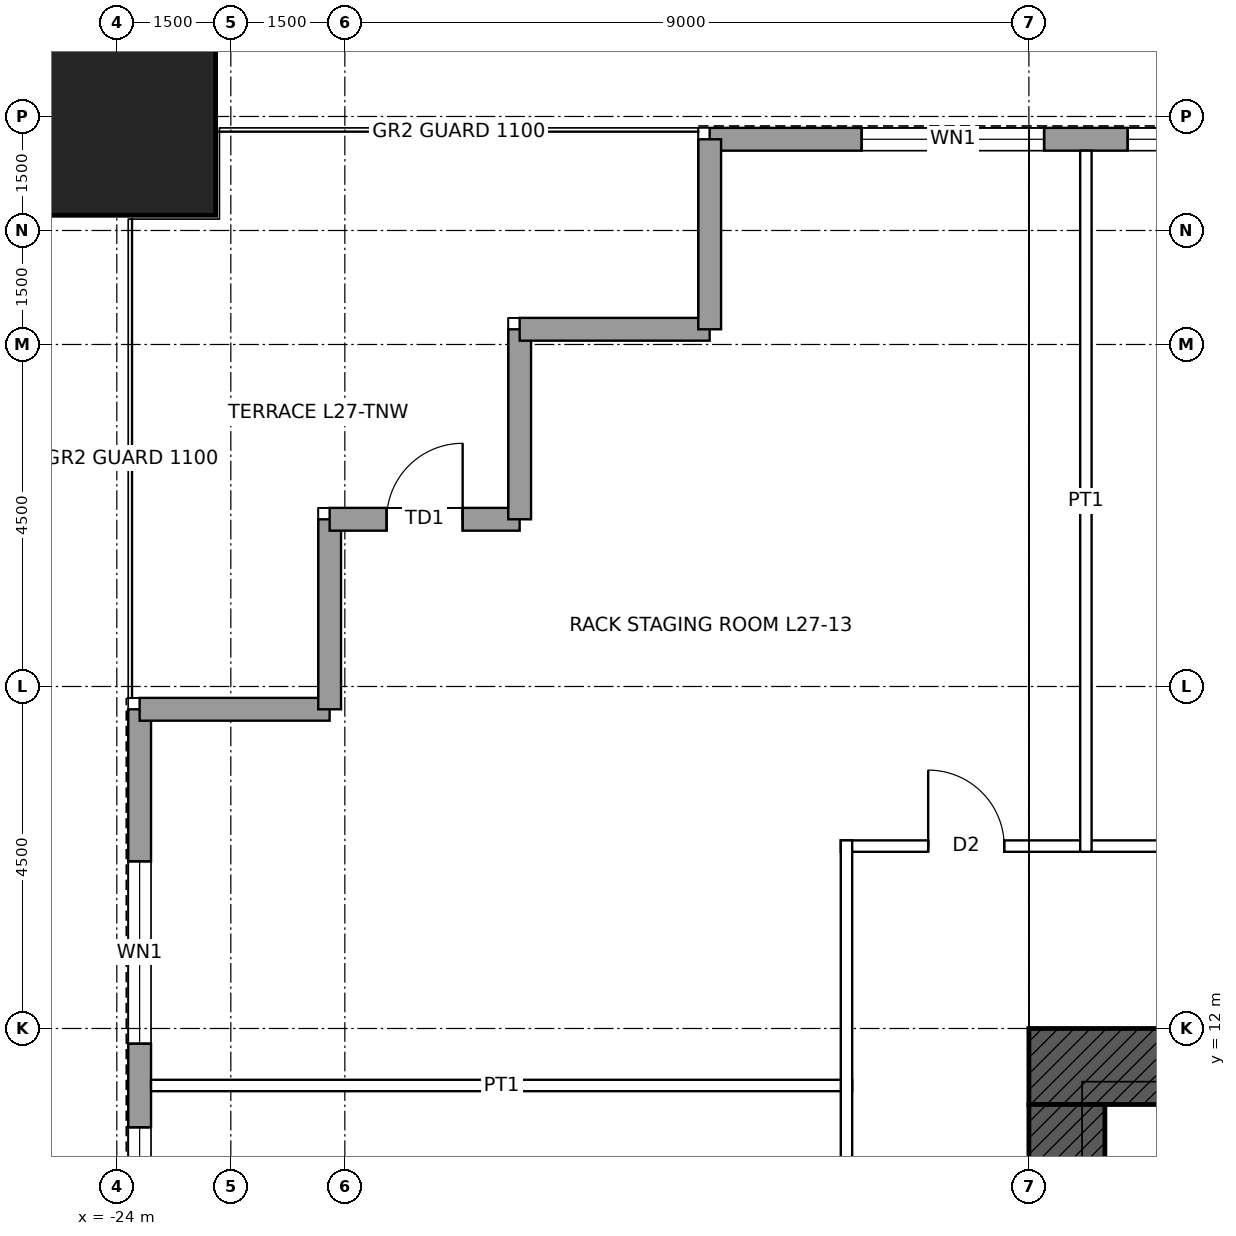
"""IFC4 building model, lengths in metres.
Left out: names, types, materials, properties, quantities, classifications, styles, units other than length and angle.
Written with IfcOpenShell. Run it as: python <this file> out.ifc"""

import sys

from ifc_helpers import new_model, si_unit, direction, frame, frame_2d, origin, origin_2d, place, context, subcontext, project, spatial, rectangle, hollow_rectangle, extrude, element, fill, save


model = new_model("IFC4")
c1 = context("Model", 3, precision=1e-05, world=origin(), true_north=direction((0.0, 1.0)))
c2 = subcontext(c1, "Body", "Model", "MODEL_VIEW")
j1 = project(units=[si_unit("LENGTHUNIT", "METRE"), si_unit("PLANEANGLEUNIT", "RADIAN")], contexts=[c1])
p1 = place(None, origin())
s1 = spatial("IfcSite", under=j1, at=p1, CompositionType="ELEMENT")
p2 = place(p1, origin())
s2 = spatial("IfcBuilding", under=s1, at=p2, CompositionType="ELEMENT")
p3 = place(p2, frame((0.0, 0.0, 135.9)))
s3 = spatial("IfcBuildingStorey", under=s2, at=p3, CompositionType="ELEMENT", Elevation=135.9)
p4 = place(p3, frame((-24.0, 24.0, 0.0), z_axis=(0.0, 0.0, 1.0), x_axis=(1.0, 0.0, 0.0)))
e1 = element("IfcColumn", 1, at=p4, inside=s3, PredefinedType="COLUMN", context=c2, shape_type="SweptSolid", body=[
    extrude(hollow_rectangle(XDim=2.6, YDim=2.6, WallThickness=0.13, at=origin_2d()), origin(), (0.0, 0.0, 1.0), 4.5),
])
p5 = place(p3, frame((-12.0, 11.5, 0.0), z_axis=(0.0, 0.0, 1.0), x_axis=(1.0, 0.0, 0.0)))
e2 = element("IfcWall", 2, at=p5, inside=s3, PredefinedType="SHEAR", context=c2, shape_type="SweptSolid", body=[
    extrude(rectangle(XDim=24.0, YDim=1.0, at=frame_2d((12.0, 0.0))), origin(), (0.0, 0.0, 1.0), 4.5),
])
p6 = place(p5, frame((6.25, 0.0, 0.0)))
e3 = element("IfcOpeningElement", 3, at=p6, cuts=e2, PredefinedType="OPENING", context=c2, shape_type="SweptSolid", body=[
    extrude(rectangle(XDim=1.0, YDim=2.4, at=frame_2d((0.5, 1.2))), frame((0.0, 0.51, 0.0), z_axis=(0.0, -1.0, 0.0), x_axis=(1.0, 0.0, 0.0)), (0.0, 0.0, 1.0), 1.02),
])
p7 = place(p5, frame((16.75, 0.0, 0.0)))
e4 = element("IfcOpeningElement", 4, at=p7, cuts=e2, PredefinedType="OPENING", context=c2, shape_type="SweptSolid", body=[
    extrude(rectangle(XDim=1.0, YDim=2.4, at=frame_2d((0.5, 1.2))), frame((0.0, 0.51, 0.0), z_axis=(0.0, -1.0, 0.0), x_axis=(1.0, 0.0, 0.0)), (0.0, 0.0, 1.0), 1.02),
])
p8 = place(p3, frame((-11.5, -11.0, 0.0), z_axis=(0.0, 0.0, 1.0), x_axis=(0.0, 1.0, 0.0)))
e5 = element("IfcWall", 5, at=p8, inside=s3, PredefinedType="SHEAR", context=c2, shape_type="SweptSolid", body=[
    extrude(rectangle(XDim=22.0, YDim=1.0, at=frame_2d((11.0, 0.0))), origin(), (0.0, 0.0, 1.0), 4.5),
])
p9 = place(p8, frame((10.5, 0.0, 0.0)))
e6 = element("IfcOpeningElement", 6, at=p9, cuts=e5, PredefinedType="OPENING", context=c2, shape_type="SweptSolid", body=[
    extrude(rectangle(XDim=1.0, YDim=2.4, at=frame_2d((0.5, 1.2))), frame((0.0, 0.51, 0.0), z_axis=(0.0, -1.0, 0.0), x_axis=(1.0, 0.0, 0.0)), (0.0, 0.0, 1.0), 1.02),
])
p10 = place(p3, frame((-16.2, 23.7, 0.0), z_axis=(0.0, 0.0, 1.0), x_axis=(1.0, 0.0, 0.0)))
e7 = element("IfcWall", 7, at=p10, inside=s3, PredefinedType="SOLIDWALL", context=c2, shape_type="SweptSolid", body=[
    extrude(rectangle(XDim=32.4, YDim=0.3, at=frame_2d((16.2, 0.0))), origin(), (0.0, 0.0, 1.0), 4.3),
])
p11 = place(p10, frame((2.0, 0.0, 1.0)))
e8 = element("IfcOpeningElement", 8, at=p11, cuts=e7, PredefinedType="OPENING", context=c2, shape_type="SweptSolid", body=[
    extrude(rectangle(XDim=2.4, YDim=1.2, at=frame_2d((1.2, 0.6))), frame((0.0, 0.16, 0.0), z_axis=(0.0, -1.0, 0.0), x_axis=(1.0, 0.0, 0.0)), (0.0, 0.0, 1.0), 0.32),
])
p12 = place(p10, frame((5.5, 0.0, 1.0)))
e9 = element("IfcOpeningElement", 9, at=p12, cuts=e7, PredefinedType="OPENING", context=c2, shape_type="SweptSolid", body=[
    extrude(rectangle(XDim=2.4, YDim=1.2, at=frame_2d((1.2, 0.6))), frame((0.0, 0.16, 0.0), z_axis=(0.0, -1.0, 0.0), x_axis=(1.0, 0.0, 0.0)), (0.0, 0.0, 1.0), 0.32),
])
p13 = place(p10, frame((9.5, 0.0, 1.0)))
e10 = element("IfcOpeningElement", 10, at=p13, cuts=e7, PredefinedType="OPENING", context=c2, shape_type="SweptSolid", body=[
    extrude(rectangle(XDim=2.4, YDim=1.2, at=frame_2d((1.2, 0.6))), frame((0.0, 0.16, 0.0), z_axis=(0.0, -1.0, 0.0), x_axis=(1.0, 0.0, 0.0)), (0.0, 0.0, 1.0), 0.32),
])
p14 = place(p10, frame((13.0, 0.0, 1.0)))
e11 = element("IfcOpeningElement", 11, at=p14, cuts=e7, PredefinedType="OPENING", context=c2, shape_type="SweptSolid", body=[
    extrude(rectangle(XDim=2.4, YDim=1.2, at=frame_2d((1.2, 0.6))), frame((0.0, 0.16, 0.0), z_axis=(0.0, -1.0, 0.0), x_axis=(1.0, 0.0, 0.0)), (0.0, 0.0, 1.0), 0.32),
])
p15 = place(p10, frame((17.0, 0.0, 1.0)))
e12 = element("IfcOpeningElement", 12, at=p15, cuts=e7, PredefinedType="OPENING", context=c2, shape_type="SweptSolid", body=[
    extrude(rectangle(XDim=2.4, YDim=1.2, at=frame_2d((1.2, 0.6))), frame((0.0, 0.16, 0.0), z_axis=(0.0, -1.0, 0.0), x_axis=(1.0, 0.0, 0.0)), (0.0, 0.0, 1.0), 0.32),
])
p16 = place(p10, frame((20.5, 0.0, 1.0)))
e13 = element("IfcOpeningElement", 13, at=p16, cuts=e7, PredefinedType="OPENING", context=c2, shape_type="SweptSolid", body=[
    extrude(rectangle(XDim=2.4, YDim=1.2, at=frame_2d((1.2, 0.6))), frame((0.0, 0.16, 0.0), z_axis=(0.0, -1.0, 0.0), x_axis=(1.0, 0.0, 0.0)), (0.0, 0.0, 1.0), 0.32),
])
p17 = place(p10, frame((24.5, 0.0, 1.0)))
e14 = element("IfcOpeningElement", 14, at=p17, cuts=e7, PredefinedType="OPENING", context=c2, shape_type="SweptSolid", body=[
    extrude(rectangle(XDim=2.4, YDim=1.2, at=frame_2d((1.2, 0.6))), frame((0.0, 0.16, 0.0), z_axis=(0.0, -1.0, 0.0), x_axis=(1.0, 0.0, 0.0)), (0.0, 0.0, 1.0), 0.32),
])
p18 = place(p10, frame((28.0, 0.0, 1.0)))
e15 = element("IfcOpeningElement", 15, at=p18, cuts=e7, PredefinedType="OPENING", context=c2, shape_type="SweptSolid", body=[
    extrude(rectangle(XDim=2.4, YDim=1.2, at=frame_2d((1.2, 0.6))), frame((0.0, 0.16, 0.0), z_axis=(0.0, -1.0, 0.0), x_axis=(1.0, 0.0, 0.0)), (0.0, 0.0, 1.0), 0.32),
])
p19 = place(p3, frame((-23.7, -16.2, 0.0), z_axis=(0.0, 0.0, 1.0), x_axis=(0.0, 1.0, 0.0)))
e16 = element("IfcWall", 16, at=p19, inside=s3, PredefinedType="SOLIDWALL", context=c2, shape_type="SweptSolid", body=[
    extrude(rectangle(XDim=32.4, YDim=0.3, at=frame_2d((16.2, 0.0))), origin(), (0.0, 0.0, 1.0), 4.3),
])
p20 = place(p19, frame((2.0, 0.0, 1.0)))
e17 = element("IfcOpeningElement", 17, at=p20, cuts=e16, PredefinedType="OPENING", context=c2, shape_type="SweptSolid", body=[
    extrude(rectangle(XDim=2.4, YDim=1.2, at=frame_2d((1.2, 0.6))), frame((0.0, 0.16, 0.0), z_axis=(0.0, -1.0, 0.0), x_axis=(1.0, 0.0, 0.0)), (0.0, 0.0, 1.0), 0.32),
])
p21 = place(p19, frame((5.5, 0.0, 1.0)))
e18 = element("IfcOpeningElement", 18, at=p21, cuts=e16, PredefinedType="OPENING", context=c2, shape_type="SweptSolid", body=[
    extrude(rectangle(XDim=2.4, YDim=1.2, at=frame_2d((1.2, 0.6))), frame((0.0, 0.16, 0.0), z_axis=(0.0, -1.0, 0.0), x_axis=(1.0, 0.0, 0.0)), (0.0, 0.0, 1.0), 0.32),
])
p22 = place(p19, frame((9.5, 0.0, 1.0)))
e19 = element("IfcOpeningElement", 19, at=p22, cuts=e16, PredefinedType="OPENING", context=c2, shape_type="SweptSolid", body=[
    extrude(rectangle(XDim=2.4, YDim=1.2, at=frame_2d((1.2, 0.6))), frame((0.0, 0.16, 0.0), z_axis=(0.0, -1.0, 0.0), x_axis=(1.0, 0.0, 0.0)), (0.0, 0.0, 1.0), 0.32),
])
p23 = place(p19, frame((13.0, 0.0, 1.0)))
e20 = element("IfcOpeningElement", 20, at=p23, cuts=e16, PredefinedType="OPENING", context=c2, shape_type="SweptSolid", body=[
    extrude(rectangle(XDim=2.4, YDim=1.2, at=frame_2d((1.2, 0.6))), frame((0.0, 0.16, 0.0), z_axis=(0.0, -1.0, 0.0), x_axis=(1.0, 0.0, 0.0)), (0.0, 0.0, 1.0), 0.32),
])
p24 = place(p19, frame((17.0, 0.0, 1.0)))
e21 = element("IfcOpeningElement", 21, at=p24, cuts=e16, PredefinedType="OPENING", context=c2, shape_type="SweptSolid", body=[
    extrude(rectangle(XDim=2.4, YDim=1.2, at=frame_2d((1.2, 0.6))), frame((0.0, 0.16, 0.0), z_axis=(0.0, -1.0, 0.0), x_axis=(1.0, 0.0, 0.0)), (0.0, 0.0, 1.0), 0.32),
])
p25 = place(p19, frame((20.5, 0.0, 1.0)))
e22 = element("IfcOpeningElement", 22, at=p25, cuts=e16, PredefinedType="OPENING", context=c2, shape_type="SweptSolid", body=[
    extrude(rectangle(XDim=2.4, YDim=1.2, at=frame_2d((1.2, 0.6))), frame((0.0, 0.16, 0.0), z_axis=(0.0, -1.0, 0.0), x_axis=(1.0, 0.0, 0.0)), (0.0, 0.0, 1.0), 0.32),
])
p26 = place(p19, frame((24.5, 0.0, 1.0)))
e23 = element("IfcOpeningElement", 23, at=p26, cuts=e16, PredefinedType="OPENING", context=c2, shape_type="SweptSolid", body=[
    extrude(rectangle(XDim=2.4, YDim=1.2, at=frame_2d((1.2, 0.6))), frame((0.0, 0.16, 0.0), z_axis=(0.0, -1.0, 0.0), x_axis=(1.0, 0.0, 0.0)), (0.0, 0.0, 1.0), 0.32),
])
p27 = place(p19, frame((28.0, 0.0, 1.0)))
e24 = element("IfcOpeningElement", 24, at=p27, cuts=e16, PredefinedType="OPENING", context=c2, shape_type="SweptSolid", body=[
    extrude(rectangle(XDim=2.4, YDim=1.2, at=frame_2d((1.2, 0.6))), frame((0.0, 0.16, 0.0), z_axis=(0.0, -1.0, 0.0), x_axis=(1.0, 0.0, 0.0)), (0.0, 0.0, 1.0), 0.32),
])
for number, where, z_axis, x_axis in (
    (25, (-23.7, 16.2, 0.0), (0.0, 0.0, 1.0), (1.0, 0.0, 0.0)),
    (26, (-21.2, 16.2, 0.0), (0.0, 0.0, 1.0), (0.0, 1.0, 0.0)),
):
    element("IfcWall", number, at=place(p3, frame(where, z_axis=z_axis, x_axis=x_axis)), inside=s3, PredefinedType="SOLIDWALL", context=c2, shape_type="SweptSolid", body=[
        extrude(rectangle(XDim=2.5, YDim=0.3, at=frame_2d((1.25, 0.0))), origin(), (0.0, 0.0, 1.0), 4.3),
    ])
p28 = place(p3, frame((-21.2, 18.7, 0.0), z_axis=(0.0, 0.0, 1.0), x_axis=(1.0, 0.0, 0.0)))
e27 = element("IfcWall", 27, at=p28, inside=s3, PredefinedType="SOLIDWALL", context=c2, shape_type="SweptSolid", body=[
    extrude(rectangle(XDim=2.5, YDim=0.3, at=frame_2d((1.25, 0.0))), origin(), (0.0, 0.0, 1.0), 4.3),
])
p29 = place(p28, frame((0.75, 0.0, 0.0)))
e28 = element("IfcOpeningElement", 28, at=p29, cuts=e27, PredefinedType="OPENING", context=c2, shape_type="SweptSolid", body=[
    extrude(rectangle(XDim=1.0, YDim=2.4, at=frame_2d((0.5, 1.2))), frame((0.0, 0.16, 0.0), z_axis=(0.0, -1.0, 0.0), x_axis=(1.0, 0.0, 0.0)), (0.0, 0.0, 1.0), 0.32),
])
for number, where, z_axis, x_axis in (
    (29, (-18.7, 18.7, 0.0), (0.0, 0.0, 1.0), (0.0, 1.0, 0.0)),
    (30, (-18.7, 21.2, 0.0), (0.0, 0.0, 1.0), (1.0, 0.0, 0.0)),
    (31, (-16.2, 21.2, 0.0), (0.0, 0.0, 1.0), (0.0, 1.0, 0.0)),
):
    element("IfcWall", number, at=place(p3, frame(where, z_axis=z_axis, x_axis=x_axis)), inside=s3, PredefinedType="SOLIDWALL", context=c2, shape_type="SweptSolid", body=[
        extrude(rectangle(XDim=2.5, YDim=0.3, at=frame_2d((1.25, 0.0))), origin(), (0.0, 0.0, 1.0), 4.3),
    ])
p30 = place(p3, frame((-23.55, 11.25, 0.0), z_axis=(0.0, 0.0, 1.0), x_axis=(1.0, 0.0, 0.0)))
e32 = element("IfcWall", 32, at=p30, inside=s3, PredefinedType="PARTITIONING", context=c2, shape_type="SweptSolid", body=[
    extrude(rectangle(XDim=9.225, YDim=0.15, at=frame_2d((4.613, 0.0))), origin(), (0.0, 0.0, 1.0), 3.431),
])
p31 = place(p3, frame((-14.475, 14.4, 0.0), z_axis=(0.0, 0.0, 1.0), x_axis=(1.0, 0.0, 0.0)))
e33 = element("IfcWall", 33, at=p31, inside=s3, PredefinedType="PARTITIONING", context=c2, shape_type="SweptSolid", body=[
    extrude(rectangle(XDim=28.95, YDim=0.15, at=frame_2d((14.475, 0.0))), origin(), (0.0, 0.0, 1.0), 4.3),
])
p32 = place(p31, frame((13.575, 0.0, 0.0)))
e34 = element("IfcOpeningElement", 34, at=p32, cuts=e33, PredefinedType="OPENING", context=c2, shape_type="SweptSolid", body=[
    extrude(rectangle(XDim=1.8, YDim=2.4, at=frame_2d((0.9, 1.2))), frame((0.0, 0.085, 0.0), z_axis=(0.0, -1.0, 0.0), x_axis=(1.0, 0.0, 0.0)), (0.0, 0.0, 1.0), 0.17),
])
p33 = place(p31, frame((26.8, 0.0, 0.0)))
e35 = element("IfcOpeningElement", 35, at=p33, cuts=e33, PredefinedType="OPENING", context=c2, shape_type="SweptSolid", body=[
    extrude(rectangle(XDim=1.0, YDim=2.1, at=frame_2d((0.5, 1.05))), frame((0.0, 0.085, 0.0), z_axis=(0.0, -1.0, 0.0), x_axis=(1.0, 0.0, 0.0)), (0.0, 0.0, 1.0), 0.17),
])
p34 = place(p31, frame((1.15, 0.0, 0.0)))
e36 = element("IfcOpeningElement", 36, at=p34, cuts=e33, PredefinedType="OPENING", context=c2, shape_type="SweptSolid", body=[
    extrude(rectangle(XDim=1.0, YDim=2.1, at=frame_2d((0.5, 1.05))), frame((0.0, 0.085, 0.0), z_axis=(0.0, -1.0, 0.0), x_axis=(1.0, 0.0, 0.0)), (0.0, 0.0, 1.0), 0.17),
])
p35 = place(p3, frame((-14.4, -14.475, 0.0), z_axis=(0.0, 0.0, 1.0), x_axis=(0.0, 1.0, 0.0)))
e37 = element("IfcWall", 37, at=p35, inside=s3, PredefinedType="PARTITIONING", context=c2, shape_type="SweptSolid", body=[
    extrude(rectangle(XDim=28.95, YDim=0.15, at=frame_2d((14.475, 0.0))), origin(), (0.0, 0.0, 1.0), 4.3),
])
p36 = place(p35, frame((4.2, 0.0, 0.0)))
e38 = element("IfcOpeningElement", 38, at=p36, cuts=e37, PredefinedType="OPENING", context=c2, shape_type="SweptSolid", body=[
    extrude(rectangle(XDim=1.8, YDim=2.4, at=frame_2d((0.9, 1.2))), frame((0.0, 0.085, 0.0), z_axis=(0.0, -1.0, 0.0), x_axis=(1.0, 0.0, 0.0)), (0.0, 0.0, 1.0), 0.17),
])
p37 = place(p35, frame((12.1, 0.0, 0.0)))
e39 = element("IfcOpeningElement", 39, at=p37, cuts=e37, PredefinedType="OPENING", context=c2, shape_type="SweptSolid", body=[
    extrude(rectangle(XDim=1.0, YDim=2.1, at=frame_2d((0.5, 1.05))), frame((0.0, 0.085, 0.0), z_axis=(0.0, -1.0, 0.0), x_axis=(1.0, 0.0, 0.0)), (0.0, 0.0, 1.0), 0.17),
])
p38 = place(p35, frame((21.075, 0.0, 0.0)))
e40 = element("IfcOpeningElement", 40, at=p38, cuts=e37, PredefinedType="OPENING", context=c2, shape_type="SweptSolid", body=[
    extrude(rectangle(XDim=1.8, YDim=2.4, at=frame_2d((0.9, 1.2))), frame((0.0, 0.085, 0.0), z_axis=(0.0, -1.0, 0.0), x_axis=(1.0, 0.0, 0.0)), (0.0, 0.0, 1.0), 0.17),
])
p39 = place(p3, frame((-11.25, 14.325, 0.0), z_axis=(0.0, 0.0, 1.0), x_axis=(0.0, 1.0, 0.0)))
e41 = element("IfcWall", 41, at=p39, inside=s3, PredefinedType="PARTITIONING", context=c2, shape_type="SweptSolid", body=[
    extrude(rectangle(XDim=9.225, YDim=0.15, at=frame_2d((4.613, 0.0))), origin(), (0.0, 0.0, 1.0), 3.431),
])
p40 = place(p11, origin())
e42 = element("IfcWindow", 42, at=p40, inside=s3, PartitioningType="SINGLE_PANEL", PredefinedType="WINDOW", context=c2, shape_type="SweptSolid", body=[
    extrude(rectangle(XDim=2.4, YDim=1.2, at=frame_2d((1.2, 0.6))), frame((0.0, 0.03, 0.0), z_axis=(0.0, -1.0, 0.0), x_axis=(1.0, 0.0, 0.0)), (0.0, 0.0, 1.0), 0.06),
])
fill(e8, e42)
p41 = place(p12, origin())
e43 = element("IfcWindow", 43, at=p41, inside=s3, PartitioningType="SINGLE_PANEL", PredefinedType="WINDOW", context=c2, shape_type="SweptSolid", body=[
    extrude(rectangle(XDim=2.4, YDim=1.2, at=frame_2d((1.2, 0.6))), frame((0.0, 0.03, 0.0), z_axis=(0.0, -1.0, 0.0), x_axis=(1.0, 0.0, 0.0)), (0.0, 0.0, 1.0), 0.06),
])
fill(e9, e43)
p42 = place(p26, origin())
e44 = element("IfcWindow", 44, at=p42, inside=s3, PartitioningType="SINGLE_PANEL", PredefinedType="WINDOW", context=c2, shape_type="SweptSolid", body=[
    extrude(rectangle(XDim=2.4, YDim=1.2, at=frame_2d((1.2, 0.6))), frame((0.0, 0.03, 0.0), z_axis=(0.0, -1.0, 0.0), x_axis=(1.0, 0.0, 0.0)), (0.0, 0.0, 1.0), 0.06),
])
fill(e23, e44)
p43 = place(p27, origin())
e45 = element("IfcWindow", 45, at=p43, inside=s3, PartitioningType="SINGLE_PANEL", PredefinedType="WINDOW", context=c2, shape_type="SweptSolid", body=[
    extrude(rectangle(XDim=2.4, YDim=1.2, at=frame_2d((1.2, 0.6))), frame((0.0, 0.03, 0.0), z_axis=(0.0, -1.0, 0.0), x_axis=(1.0, 0.0, 0.0)), (0.0, 0.0, 1.0), 0.06),
])
fill(e24, e45)
p44 = place(p29, origin())
e46 = element("IfcDoor", 46, at=p44, inside=s3, OperationType="SINGLE_SWING_RIGHT", PredefinedType="DOOR", context=c2, shape_type="SweptSolid", body=[
    extrude(rectangle(XDim=1.0, YDim=2.4, at=frame_2d((0.5, 1.2))), frame((0.0, 0.025, 0.0), z_axis=(0.0, -1.0, 0.0), x_axis=(1.0, 0.0, 0.0)), (0.0, 0.0, 1.0), 0.05),
])
fill(e28, e46)
p45 = place(p34, origin())
e47 = element("IfcDoor", 47, at=p45, inside=s3, OperationType="SINGLE_SWING_LEFT", PredefinedType="DOOR", context=c2, shape_type="SweptSolid", body=[
    extrude(rectangle(XDim=1.0, YDim=2.1, at=frame_2d((0.5, 1.05))), frame((0.0, 0.025, 0.0), z_axis=(0.0, -1.0, 0.0), x_axis=(1.0, 0.0, 0.0)), (0.0, 0.0, 1.0), 0.05),
])
fill(e36, e47)
save(model, sys.argv[1])
